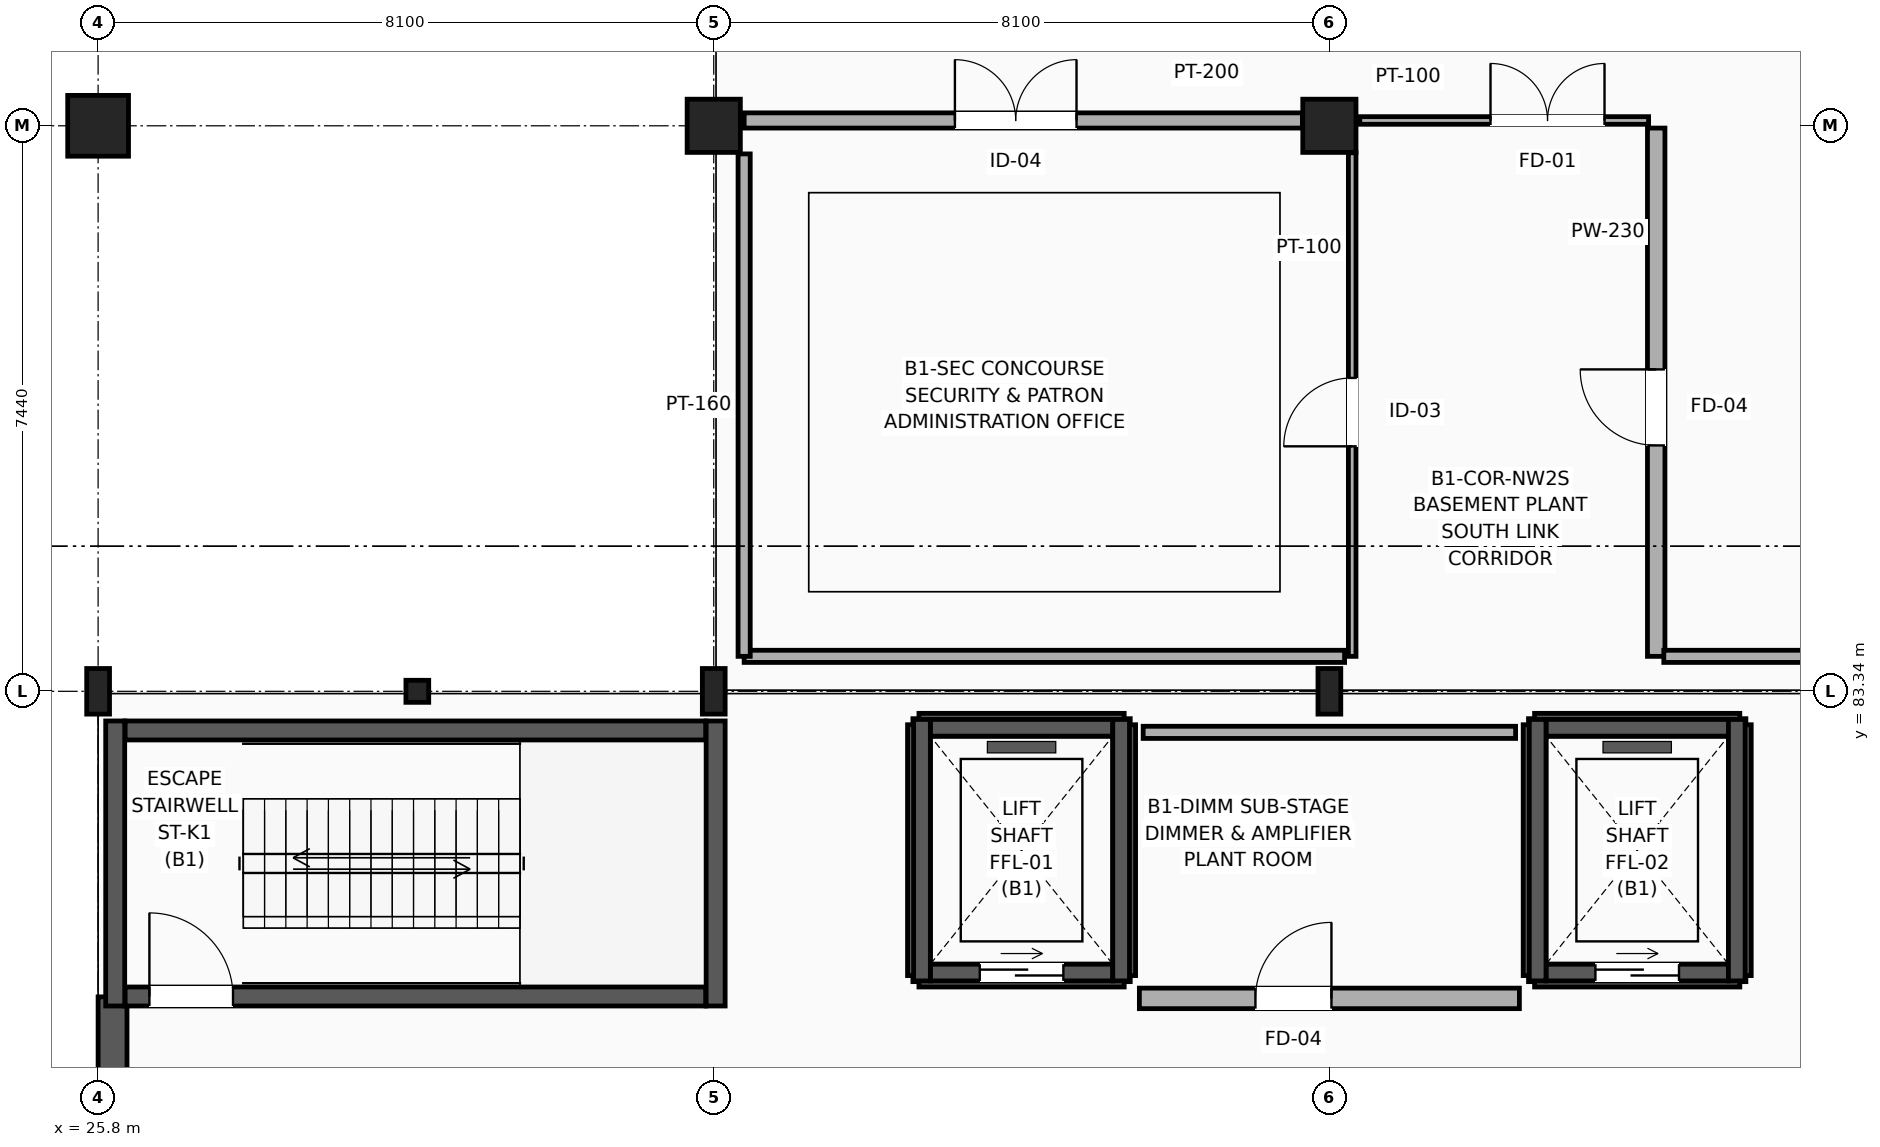
"""IFC4 building model, lengths in metres.
Left out: names, types, materials, properties, quantities, classifications, styles, units other than length and angle.
Written with IfcOpenShell. Run it as: python <this file> out.ifc"""

import sys

from ifc_helpers import new_model, si_unit, direction, frame, frame_2d, origin, origin_2d, place, context, subcontext, project, spatial, rectangle, i_section, extrude, element, fill, save


model = new_model("IFC4")
c1 = context("Model", 3, precision=1e-05, world=origin(), true_north=direction((0.0, 1.0)))
c2 = subcontext(c1, "Body", "Model", "MODEL_VIEW")
j1 = project(units=[si_unit("LENGTHUNIT", "METRE"), si_unit("PLANEANGLEUNIT", "RADIAN")], contexts=[c1])
p1 = place(None, origin())
s1 = spatial("IfcSite", under=j1, at=p1, CompositionType="ELEMENT")
p2 = place(p1, origin())
s2 = spatial("IfcBuilding", under=s1, at=p2, CompositionType="ELEMENT")
p3 = place(p2, frame((0.0, 0.0, -4.8)))
s3 = spatial("IfcBuildingStorey", under=s2, at=p3, CompositionType="ELEMENT", Elevation=-4.8)
p4 = place(p3, frame((25.8, 83.34, 0.0), z_axis=(0.0, 0.0, 1.0), x_axis=(1.0, 0.0, 0.0)))
e1 = element("IfcColumn", 1, at=p4, inside=s3, PredefinedType="COLUMN", context=c2, shape_type="SweptSolid", body=[
    extrude(i_section(OverallWidth=0.3, OverallDepth=0.6, WebThickness=0.015, FlangeThickness=0.03, FilletRadius=0.027, at=origin_2d()), origin(), (0.0, 0.0, 1.0), 4.8),
])
p5 = place(p3, frame((25.8, 90.78, 0.0), z_axis=(0.0, 0.0, 1.0), x_axis=(1.0, 0.0, 0.0)))
e2 = element("IfcColumn", 2, at=p5, inside=s3, PredefinedType="COLUMN", context=c2, shape_type="SweptSolid", body=[
    extrude(rectangle(XDim=0.8, YDim=0.8, at=origin_2d()), origin(), (0.0, 0.0, 1.0), 4.8),
])
p6 = place(p3, frame((33.9, 83.34, 0.0), z_axis=(0.0, 0.0, 1.0), x_axis=(1.0, 0.0, 0.0)))
e3 = element("IfcColumn", 3, at=p6, inside=s3, PredefinedType="COLUMN", context=c2, shape_type="SweptSolid", body=[
    extrude(i_section(OverallWidth=0.3, OverallDepth=0.6, WebThickness=0.015, FlangeThickness=0.03, FilletRadius=0.027, at=origin_2d()), origin(), (0.0, 0.0, 1.0), 4.8),
])
p7 = place(p3, frame((33.9, 90.78, 0.0), z_axis=(0.0, 0.0, 1.0), x_axis=(1.0, 0.0, 0.0)))
e4 = element("IfcColumn", 4, at=p7, inside=s3, PredefinedType="COLUMN", context=c2, shape_type="SweptSolid", body=[
    extrude(rectangle(XDim=0.7, YDim=0.7, at=origin_2d()), origin(), (0.0, 0.0, 1.0), 4.8),
])
p8 = place(p3, frame((42.0, 83.34, 0.0), z_axis=(0.0, 0.0, 1.0), x_axis=(1.0, 0.0, 0.0)))
e5 = element("IfcColumn", 5, at=p8, inside=s3, PredefinedType="COLUMN", context=c2, shape_type="SweptSolid", body=[
    extrude(i_section(OverallWidth=0.3, OverallDepth=0.6, WebThickness=0.015, FlangeThickness=0.03, FilletRadius=0.027, at=origin_2d()), origin(), (0.0, 0.0, 1.0), 4.8),
])
p9 = place(p3, frame((42.0, 90.78, 0.0), z_axis=(0.0, 0.0, 1.0), x_axis=(1.0, 0.0, 0.0)))
e6 = element("IfcColumn", 6, at=p9, inside=s3, PredefinedType="COLUMN", context=c2, shape_type="SweptSolid", body=[
    extrude(rectangle(XDim=0.7, YDim=0.7, at=origin_2d()), origin(), (0.0, 0.0, 1.0), 4.8),
])
p10 = place(p3, frame((30.0, 83.34, 0.0), z_axis=(0.0, 0.0, 1.0), x_axis=(1.0, 0.0, 0.0)))
e7 = element("IfcColumn", 7, at=p10, inside=s3, PredefinedType="COLUMN", context=c2, shape_type="SweptSolid", body=[
    extrude(i_section(OverallWidth=0.3, OverallDepth=0.29, WebThickness=0.009, FlangeThickness=0.014, FilletRadius=0.027, at=origin_2d()), origin(), (0.0, 0.0, 1.0), 4.8),
])
p11 = place(p3, frame((25.99, 60.95, 0.0), z_axis=(0.0, 0.0, 1.0), x_axis=(0.0, 1.0, 0.0)))
e8 = element("IfcWall", 8, at=p11, inside=s3, PredefinedType="USERDEFINED", context=c2, shape_type="SweptSolid", body=[
    extrude(rectangle(XDim=18.37, YDim=0.38, at=frame_2d((9.185, 0.0))), origin(), (0.0, 0.0, 1.0), 4.48),
])
p12 = place(p3, frame((36.6, 79.6, -1.2), z_axis=(0.0, 0.0, 1.0), x_axis=(1.0, 0.0, 0.0)))
e9 = element("IfcWall", 9, at=p12, inside=s3, PredefinedType="USERDEFINED", context=c2, shape_type="SweptSolid", body=[
    extrude(rectangle(XDim=2.7, YDim=0.3, at=frame_2d((1.35, 0.0))), origin(), (0.0, 0.0, 1.0), 1.2),
])
p13 = place(p3, frame((39.3, 79.6, -1.2), z_axis=(0.0, 0.0, 1.0), x_axis=(0.0, 1.0, 0.0)))
e10 = element("IfcWall", 10, at=p13, inside=s3, PredefinedType="USERDEFINED", context=c2, shape_type="SweptSolid", body=[
    extrude(rectangle(XDim=3.3, YDim=0.3, at=frame_2d((1.65, 0.0))), origin(), (0.0, 0.0, 1.0), 1.2),
])
p14 = place(p3, frame((39.3, 82.9, -1.2), z_axis=(0.0, 0.0, 1.0), x_axis=(-1.0, 0.0, 0.0)))
e11 = element("IfcWall", 11, at=p14, inside=s3, PredefinedType="USERDEFINED", context=c2, shape_type="SweptSolid", body=[
    extrude(rectangle(XDim=2.7, YDim=0.3, at=frame_2d((1.35, 0.0))), origin(), (0.0, 0.0, 1.0), 1.2),
])
p15 = place(p3, frame((36.6, 82.9, -1.2), z_axis=(0.0, 0.0, 1.0), x_axis=(0.0, -1.0, 0.0)))
e12 = element("IfcWall", 12, at=p15, inside=s3, PredefinedType="USERDEFINED", context=c2, shape_type="SweptSolid", body=[
    extrude(rectangle(XDim=3.3, YDim=0.3, at=frame_2d((1.65, 0.0))), origin(), (0.0, 0.0, 1.0), 1.2),
])
p16 = place(p3, frame((44.7, 79.6, -1.2), z_axis=(0.0, 0.0, 1.0), x_axis=(1.0, 0.0, 0.0)))
e13 = element("IfcWall", 13, at=p16, inside=s3, PredefinedType="USERDEFINED", context=c2, shape_type="SweptSolid", body=[
    extrude(rectangle(XDim=2.7, YDim=0.3, at=frame_2d((1.35, 0.0))), origin(), (0.0, 0.0, 1.0), 1.2),
])
p17 = place(p3, frame((47.4, 79.6, -1.2), z_axis=(0.0, 0.0, 1.0), x_axis=(0.0, 1.0, 0.0)))
e14 = element("IfcWall", 14, at=p17, inside=s3, PredefinedType="USERDEFINED", context=c2, shape_type="SweptSolid", body=[
    extrude(rectangle(XDim=3.3, YDim=0.3, at=frame_2d((1.65, 0.0))), origin(), (0.0, 0.0, 1.0), 1.2),
])
p18 = place(p3, frame((47.4, 82.9, -1.2), z_axis=(0.0, 0.0, 1.0), x_axis=(-1.0, 0.0, 0.0)))
e15 = element("IfcWall", 15, at=p18, inside=s3, PredefinedType="USERDEFINED", context=c2, shape_type="SweptSolid", body=[
    extrude(rectangle(XDim=2.7, YDim=0.3, at=frame_2d((1.35, 0.0))), origin(), (0.0, 0.0, 1.0), 1.2),
])
p19 = place(p3, frame((44.7, 82.9, -1.2), z_axis=(0.0, 0.0, 1.0), x_axis=(0.0, -1.0, 0.0)))
e16 = element("IfcWall", 16, at=p19, inside=s3, PredefinedType="USERDEFINED", context=c2, shape_type="SweptSolid", body=[
    extrude(rectangle(XDim=3.3, YDim=0.3, at=frame_2d((1.65, 0.0))), origin(), (0.0, 0.0, 1.0), 1.2),
])
p20 = place(p3, frame((26.155, 79.325, 0.0), z_axis=(0.0, 0.0, 1.0), x_axis=(1.0, 0.0, 0.0)))
e17 = element("IfcWall", 17, at=p20, inside=s3, PredefinedType="SHEAR", context=c2, shape_type="SweptSolid", body=[
    extrude(rectangle(XDim=7.64, YDim=0.25, at=frame_2d((3.82, 0.0))), origin(), (0.0, 0.0, 1.0), 4.48),
])
p21 = place(p20, frame((0.32, 0.0, 0.0)))
e18 = element("IfcOpeningElement", 18, at=p21, cuts=e17, PredefinedType="OPENING", context=c2, shape_type="SweptSolid", body=[
    extrude(rectangle(XDim=1.1, YDim=2.2, at=frame_2d((0.55, 1.1))), frame((0.0, 0.135, 0.0), z_axis=(0.0, -1.0, 0.0), x_axis=(1.0, 0.0, 0.0)), (0.0, 0.0, 1.0), 0.27),
])
p22 = place(p3, frame((26.155, 82.825, 0.0), z_axis=(0.0, 0.0, 1.0), x_axis=(1.0, 0.0, 0.0)))
e19 = element("IfcWall", 19, at=p22, inside=s3, PredefinedType="SHEAR", context=c2, shape_type="SweptSolid", body=[
    extrude(rectangle(XDim=7.64, YDim=0.25, at=frame_2d((3.82, 0.0))), origin(), (0.0, 0.0, 1.0), 4.48),
])
for number, where, z_axis, x_axis in (
    (20, (26.025, 79.2, 0.0), (0.0, 0.0, 1.0), (0.0, 1.0, 0.0)),
    (21, (33.925, 79.2, 0.0), (0.0, 0.0, 1.0), (0.0, 1.0, 0.0)),
):
    element("IfcWall", number, at=place(p3, frame(where, z_axis=z_axis, x_axis=x_axis)), inside=s3, PredefinedType="SHEAR", context=c2, shape_type="SweptSolid", body=[
        extrude(rectangle(XDim=3.75, YDim=0.25, at=frame_2d((1.875, 0.0))), origin(), (0.0, 0.0, 1.0), 4.48),
    ])
p23 = place(p3, frame((36.75, 79.64, 0.0), z_axis=(0.0, 0.0, 1.0), x_axis=(1.0, 0.0, 0.0)))
e22 = element("IfcWall", 22, at=p23, inside=s3, PredefinedType="SOLIDWALL", context=c2, shape_type="SweptSolid", body=[
    extrude(rectangle(XDim=2.4, YDim=0.22, at=frame_2d((1.2, 0.0))), origin(), (0.0, 0.0, 1.0), 4.48),
])
p24 = place(p23, frame((0.65, 0.0, 0.0)))
e23 = element("IfcOpeningElement", 23, at=p24, cuts=e22, PredefinedType="OPENING", context=c2, shape_type="SweptSolid", body=[
    extrude(rectangle(XDim=1.1, YDim=2.2, at=frame_2d((0.55, 1.1))), frame((0.0, 0.12, 0.0), z_axis=(0.0, -1.0, 0.0), x_axis=(1.0, 0.0, 0.0)), (0.0, 0.0, 1.0), 0.24),
])
p25 = place(p3, frame((36.75, 82.86, 0.0), z_axis=(0.0, 0.0, 1.0), x_axis=(1.0, 0.0, 0.0)))
e24 = element("IfcWall", 24, at=p25, inside=s3, PredefinedType="SOLIDWALL", context=c2, shape_type="SweptSolid", body=[
    extrude(rectangle(XDim=2.4, YDim=0.22, at=frame_2d((1.2, 0.0))), origin(), (0.0, 0.0, 1.0), 4.48),
])
for number, where, z_axis, x_axis in (
    (25, (36.64, 79.53, 0.0), (0.0, 0.0, 1.0), (0.0, 1.0, 0.0)),
    (26, (39.26, 79.53, 0.0), (0.0, 0.0, 1.0), (0.0, 1.0, 0.0)),
):
    element("IfcWall", number, at=place(p3, frame(where, z_axis=z_axis, x_axis=x_axis)), inside=s3, PredefinedType="SOLIDWALL", context=c2, shape_type="SweptSolid", body=[
        extrude(rectangle(XDim=3.44, YDim=0.22, at=frame_2d((1.72, 0.0))), origin(), (0.0, 0.0, 1.0), 4.48),
    ])
p26 = place(p3, frame((44.85, 79.64, 0.0), z_axis=(0.0, 0.0, 1.0), x_axis=(1.0, 0.0, 0.0)))
e27 = element("IfcWall", 27, at=p26, inside=s3, PredefinedType="SOLIDWALL", context=c2, shape_type="SweptSolid", body=[
    extrude(rectangle(XDim=2.4, YDim=0.22, at=frame_2d((1.2, 0.0))), origin(), (0.0, 0.0, 1.0), 4.48),
])
p27 = place(p26, frame((0.65, 0.0, 0.0)))
e28 = element("IfcOpeningElement", 28, at=p27, cuts=e27, PredefinedType="OPENING", context=c2, shape_type="SweptSolid", body=[
    extrude(rectangle(XDim=1.1, YDim=2.2, at=frame_2d((0.55, 1.1))), frame((0.0, 0.12, 0.0), z_axis=(0.0, -1.0, 0.0), x_axis=(1.0, 0.0, 0.0)), (0.0, 0.0, 1.0), 0.24),
])
p28 = place(p3, frame((44.85, 82.86, 0.0), z_axis=(0.0, 0.0, 1.0), x_axis=(1.0, 0.0, 0.0)))
e29 = element("IfcWall", 29, at=p28, inside=s3, PredefinedType="SOLIDWALL", context=c2, shape_type="SweptSolid", body=[
    extrude(rectangle(XDim=2.4, YDim=0.22, at=frame_2d((1.2, 0.0))), origin(), (0.0, 0.0, 1.0), 4.48),
])
for number, where, z_axis, x_axis in (
    (30, (44.74, 79.53, 0.0), (0.0, 0.0, 1.0), (0.0, 1.0, 0.0)),
    (31, (47.36, 79.53, 0.0), (0.0, 0.0, 1.0), (0.0, 1.0, 0.0)),
):
    element("IfcWall", number, at=place(p3, frame(where, z_axis=z_axis, x_axis=x_axis)), inside=s3, PredefinedType="SOLIDWALL", context=c2, shape_type="SweptSolid", body=[
        extrude(rectangle(XDim=3.44, YDim=0.22, at=frame_2d((1.72, 0.0))), origin(), (0.0, 0.0, 1.0), 4.48),
    ])
p29 = place(p3, frame((39.5, 79.3, 0.0), z_axis=(0.0, 0.0, 1.0), x_axis=(1.0, 0.0, 0.0)))
e32 = element("IfcWall", 32, at=p29, inside=s3, PredefinedType="SOLIDWALL", context=c2, shape_type="SweptSolid", body=[
    extrude(rectangle(XDim=5.0, YDim=0.27, at=frame_2d((2.5, 0.0))), origin(), (0.0, 0.0, 1.0), 4.46),
])
p30 = place(p29, frame((1.527, 0.0, 0.0)))
e33 = element("IfcOpeningElement", 33, at=p30, cuts=e32, PredefinedType="OPENING", context=c2, shape_type="SweptSolid", body=[
    extrude(rectangle(XDim=1.0, YDim=2.15, at=frame_2d((0.5, 1.075))), frame((0.0, 0.145, 0.0), z_axis=(0.0, -1.0, 0.0), x_axis=(1.0, 0.0, 0.0)), (0.0, 0.0, 1.0), 0.29),
])
p31 = place(p3, frame((42.4, 90.85, 0.0), z_axis=(0.0, 0.0, 1.0), x_axis=(1.0, 0.0, 0.0)))
e34 = element("IfcWall", 34, at=p31, inside=s3, PredefinedType="PARTITIONING", context=c2, shape_type="SweptSolid", body=[
    extrude(rectangle(XDim=3.8, YDim=0.1, at=frame_2d((1.9, 0.0))), origin(), (0.0, 0.0, 1.0), 3.512),
])
p32 = place(p31, frame((1.72, 0.0, 0.0)))
e35 = element("IfcOpeningElement", 35, at=p32, cuts=e34, PredefinedType="OPENING", context=c2, shape_type="SweptSolid", body=[
    extrude(rectangle(XDim=1.5, YDim=2.2, at=frame_2d((0.75, 1.1))), frame((0.0, 0.06, 0.0), z_axis=(0.0, -1.0, 0.0), x_axis=(1.0, 0.0, 0.0)), (0.0, 0.0, 1.0), 0.12),
])
p33 = place(p3, frame((46.3, 83.8, 0.0), z_axis=(0.0, 0.0, 1.0), x_axis=(0.0, 1.0, 0.0)))
e36 = element("IfcWall", 36, at=p33, inside=s3, PredefinedType="SOLIDWALL", context=c2, shape_type="SweptSolid", body=[
    extrude(rectangle(XDim=6.95, YDim=0.23, at=frame_2d((3.475, 0.0))), origin(), (0.0, 0.0, 1.0), 3.512),
])
p34 = place(p33, frame((2.775, 0.0, 0.0)))
e37 = element("IfcOpeningElement", 37, at=p34, cuts=e36, PredefinedType="OPENING", context=c2, shape_type="SweptSolid", body=[
    extrude(rectangle(XDim=1.0, YDim=2.15, at=frame_2d((0.5, 1.075))), frame((0.0, 0.125, 0.0), z_axis=(0.0, -1.0, 0.0), x_axis=(1.0, 0.0, 0.0)), (0.0, 0.0, 1.0), 0.25),
])
p35 = place(p3, frame((42.3, 83.8, 0.0), z_axis=(0.0, 0.0, 1.0), x_axis=(0.0, 1.0, 0.0)))
e38 = element("IfcWall", 38, at=p35, inside=s3, PredefinedType="PARTITIONING", context=c2, shape_type="SweptSolid", body=[
    extrude(rectangle(XDim=6.625, YDim=0.1, at=frame_2d((3.312, 0.0))), origin(), (0.0, 0.0, 1.0), 4.46),
])
p36 = place(p35, frame((2.763, 0.0, 0.0)))
e39 = element("IfcOpeningElement", 39, at=p36, cuts=e38, PredefinedType="OPENING", context=c2, shape_type="SweptSolid", body=[
    extrude(rectangle(XDim=0.9, YDim=2.1, at=frame_2d((0.45, 1.05))), frame((0.0, 0.06, 0.0), z_axis=(0.0, -1.0, 0.0), x_axis=(1.0, 0.0, 0.0)), (0.0, 0.0, 1.0), 0.12),
])
p37 = place(p3, frame((34.3, 90.85, 0.0), z_axis=(0.0, 0.0, 1.0), x_axis=(1.0, 0.0, 0.0)))
e40 = element("IfcWall", 40, at=p37, inside=s3, PredefinedType="PARTITIONING", context=c2, shape_type="SweptSolid", body=[
    extrude(rectangle(XDim=7.345, YDim=0.2, at=frame_2d((3.672, 0.0))), origin(), (0.0, 0.0, 1.0), 3.512),
])
p38 = place(p37, frame((2.773, 0.0, 0.0)))
e41 = element("IfcOpeningElement", 41, at=p38, cuts=e40, PredefinedType="OPENING", context=c2, shape_type="SweptSolid", body=[
    extrude(rectangle(XDim=1.6, YDim=2.3, at=frame_2d((0.8, 1.15))), frame((0.0, 0.11, 0.0), z_axis=(0.0, -1.0, 0.0), x_axis=(1.0, 0.0, 0.0)), (0.0, 0.0, 1.0), 0.22),
])
p39 = place(p3, frame((39.55, 82.8, 0.0), z_axis=(0.0, 0.0, 1.0), x_axis=(1.0, 0.0, 0.0)))
e42 = element("IfcWall", 42, at=p39, inside=s3, PredefinedType="PARTITIONING", context=c2, shape_type="SweptSolid", body=[
    extrude(rectangle(XDim=4.9, YDim=0.16, at=frame_2d((2.45, 0.0))), origin(), (0.0, 0.0, 1.0), 4.46),
])
p40 = place(p3, frame((46.4, 83.8, 0.0), z_axis=(0.0, 0.0, 1.0), x_axis=(1.0, 0.0, 0.0)))
e43 = element("IfcWall", 43, at=p40, inside=s3, PredefinedType="PARTITIONING", context=c2, shape_type="SweptSolid", body=[
    extrude(rectangle(XDim=19.4, YDim=0.16, at=frame_2d((9.7, 0.0))), origin(), (0.0, 0.0, 1.0), 3.712),
])
p41 = place(p3, frame((34.3, 83.8, 0.0), z_axis=(0.0, 0.0, 1.0), x_axis=(1.0, 0.0, 0.0)))
e44 = element("IfcWall", 44, at=p41, inside=s3, PredefinedType="PARTITIONING", context=c2, shape_type="SweptSolid", body=[
    extrude(rectangle(XDim=7.9, YDim=0.16, at=frame_2d((3.95, 0.0))), origin(), (0.0, 0.0, 1.0), 3.712),
])
p42 = place(p3, frame((34.3, 83.8, 0.0), z_axis=(0.0, 0.0, 1.0), x_axis=(0.0, 1.0, 0.0)))
e45 = element("IfcWall", 45, at=p42, inside=s3, PredefinedType="PARTITIONING", context=c2, shape_type="SweptSolid", body=[
    extrude(rectangle(XDim=6.61, YDim=0.16, at=frame_2d((3.305, 0.0))), origin(), (0.0, 0.0, 1.0), 4.46),
])
p43 = place(p21, origin())
e46 = element("IfcDoor", 46, at=p43, inside=s3, OperationType="SINGLE_SWING_LEFT", PredefinedType="DOOR", context=c2, shape_type="SweptSolid", body=[
    extrude(rectangle(XDim=1.1, YDim=2.2, at=frame_2d((0.55, 1.1))), frame((0.0, 0.025, 0.0), z_axis=(0.0, -1.0, 0.0), x_axis=(1.0, 0.0, 0.0)), (0.0, 0.0, 1.0), 0.05),
])
fill(e18, e46)
p44 = place(p24, origin())
e47 = element("IfcDoor", 47, at=p44, inside=s3, OperationType="SLIDING_TO_LEFT", PredefinedType="DOOR", context=c2, shape_type="SweptSolid", body=[
    extrude(rectangle(XDim=1.1, YDim=2.2, at=frame_2d((0.55, 1.1))), frame((0.0, 0.025, 0.0), z_axis=(0.0, -1.0, 0.0), x_axis=(1.0, 0.0, 0.0)), (0.0, 0.0, 1.0), 0.05),
])
fill(e23, e47)
p45 = place(p27, origin())
e48 = element("IfcDoor", 48, at=p45, inside=s3, OperationType="SLIDING_TO_LEFT", PredefinedType="DOOR", context=c2, shape_type="SweptSolid", body=[
    extrude(rectangle(XDim=1.1, YDim=2.2, at=frame_2d((0.55, 1.1))), frame((0.0, 0.025, 0.0), z_axis=(0.0, -1.0, 0.0), x_axis=(1.0, 0.0, 0.0)), (0.0, 0.0, 1.0), 0.05),
])
fill(e28, e48)
p46 = place(p30, origin())
e49 = element("IfcDoor", 49, at=p46, inside=s3, OperationType="SINGLE_SWING_RIGHT", PredefinedType="DOOR", context=c2, shape_type="SweptSolid", body=[
    extrude(rectangle(XDim=1.0, YDim=2.15, at=frame_2d((0.5, 1.075))), frame((0.0, 0.025, 0.0), z_axis=(0.0, -1.0, 0.0), x_axis=(1.0, 0.0, 0.0)), (0.0, 0.0, 1.0), 0.05),
])
fill(e33, e49)
p47 = place(p32, origin())
e50 = element("IfcDoor", 50, at=p47, inside=s3, OperationType="DOUBLE_DOOR_SINGLE_SWING", PredefinedType="DOOR", context=c2, shape_type="SweptSolid", body=[
    extrude(rectangle(XDim=1.5, YDim=2.2, at=frame_2d((0.75, 1.1))), frame((0.0, 0.025, 0.0), z_axis=(0.0, -1.0, 0.0), x_axis=(1.0, 0.0, 0.0)), (0.0, 0.0, 1.0), 0.05),
])
fill(e35, e50)
p48 = place(p34, origin())
e51 = element("IfcDoor", 51, at=p48, inside=s3, OperationType="SINGLE_SWING_RIGHT", PredefinedType="DOOR", context=c2, shape_type="SweptSolid", body=[
    extrude(rectangle(XDim=1.0, YDim=2.15, at=frame_2d((0.5, 1.075))), frame((0.0, 0.025, 0.0), z_axis=(0.0, -1.0, 0.0), x_axis=(1.0, 0.0, 0.0)), (0.0, 0.0, 1.0), 0.05),
])
fill(e37, e51)
p49 = place(p36, origin())
e52 = element("IfcDoor", 52, at=p49, inside=s3, OperationType="SINGLE_SWING_LEFT", PredefinedType="DOOR", context=c2, shape_type="SweptSolid", body=[
    extrude(rectangle(XDim=0.9, YDim=2.1, at=frame_2d((0.45, 1.05))), frame((0.0, 0.025, 0.0), z_axis=(0.0, -1.0, 0.0), x_axis=(1.0, 0.0, 0.0)), (0.0, 0.0, 1.0), 0.05),
])
fill(e39, e52)
p50 = place(p38, origin())
e53 = element("IfcDoor", 53, at=p50, inside=s3, OperationType="DOUBLE_DOOR_SINGLE_SWING", PredefinedType="DOOR", context=c2, shape_type="SweptSolid", body=[
    extrude(rectangle(XDim=1.6, YDim=2.3, at=frame_2d((0.8, 1.15))), frame((0.0, 0.025, 0.0), z_axis=(0.0, -1.0, 0.0), x_axis=(1.0, 0.0, 0.0)), (0.0, 0.0, 1.0), 0.05),
])
fill(e41, e53)
save(model, sys.argv[1])
